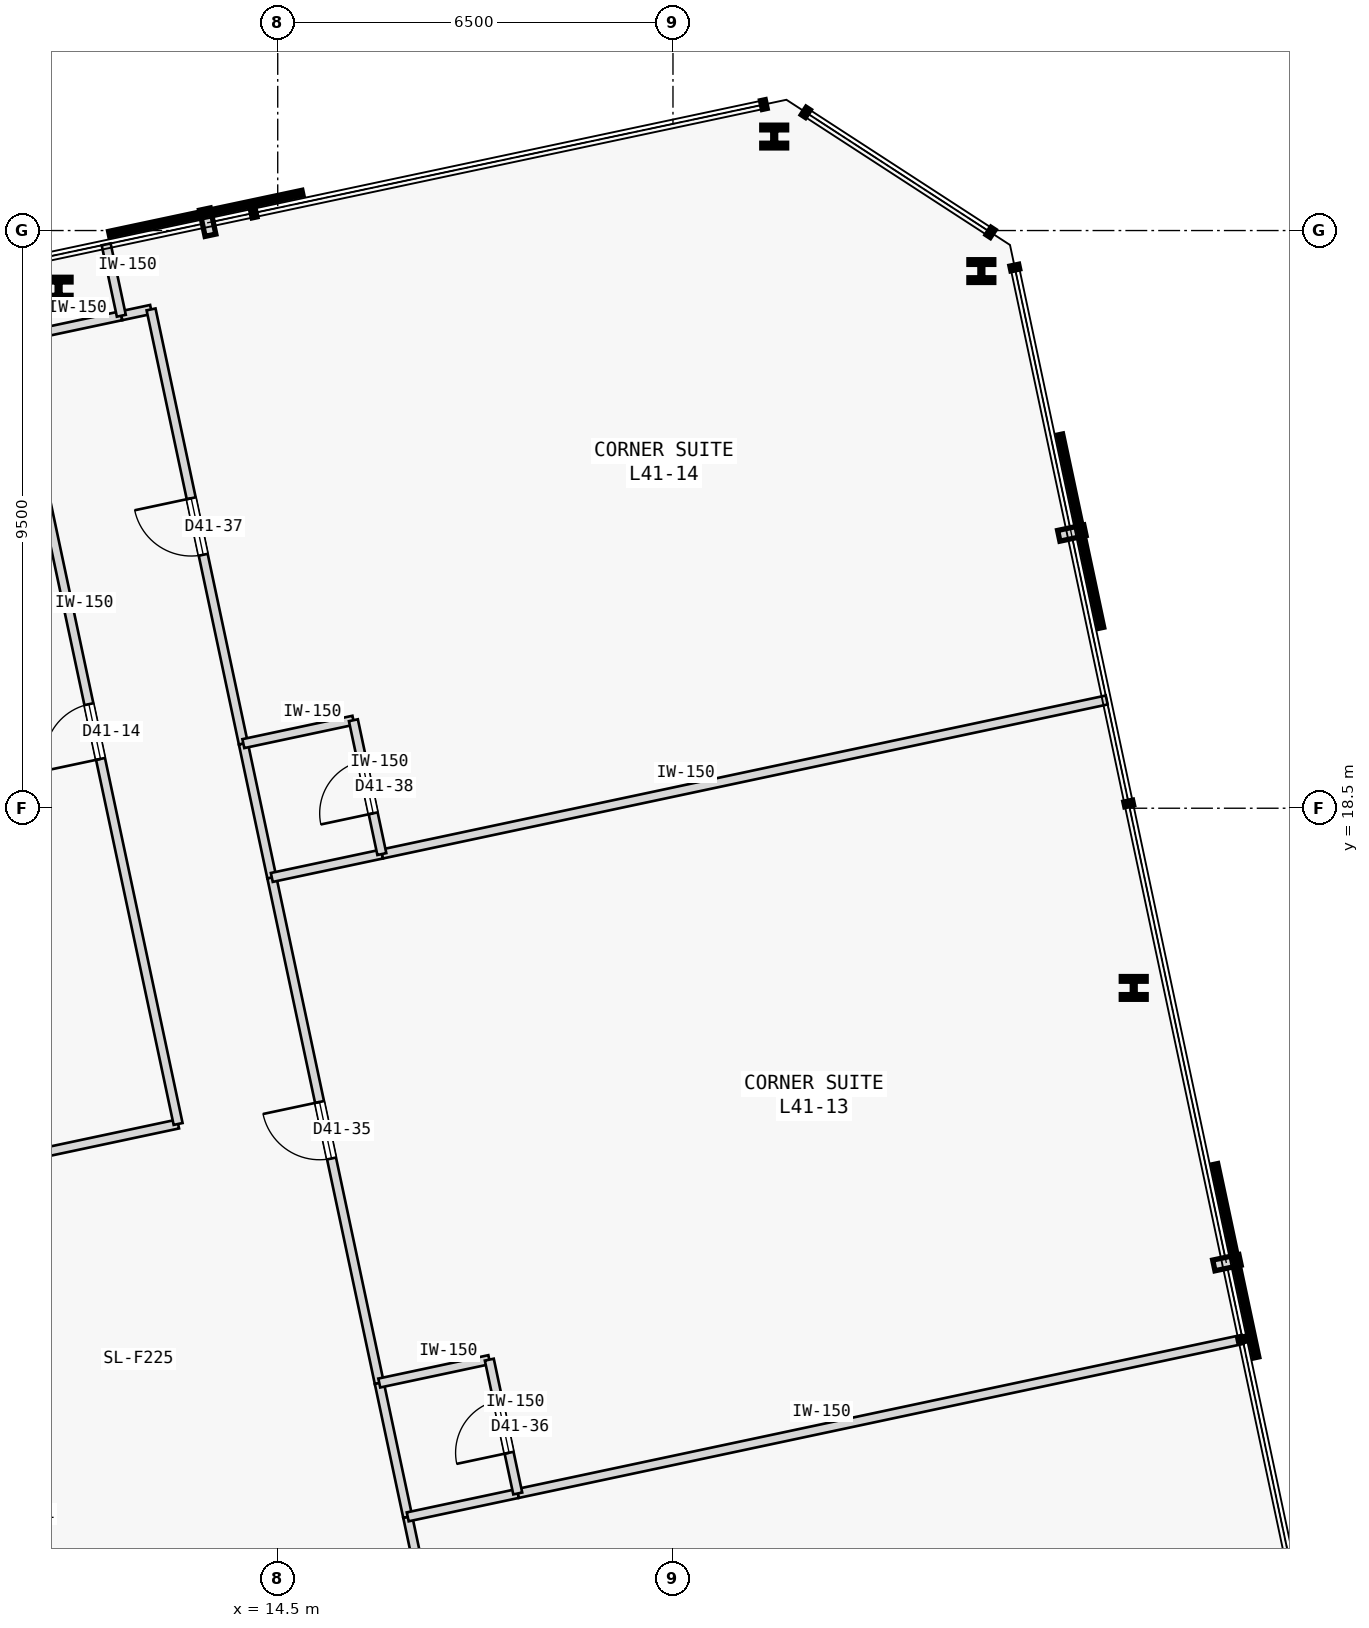
"""IFC4 building model, lengths in metres.
Left out: names, types, materials, properties, quantities, classifications, styles, units other than length and angle.
Written with IfcOpenShell. Run it as: python <this file> out.ifc"""

import sys

from ifc_helpers import new_model, si_unit, direction, frame, frame_2d, origin, origin_2d, place, context, subcontext, project, spatial, rectangle, i_section, extrude, element, fill, save


model = new_model("IFC4")
c1 = context("Model", 3, precision=1e-05, world=origin(), true_north=direction((0.0, 1.0)))
c2 = subcontext(c1, "Body", "Model", "MODEL_VIEW")
j1 = project(units=[si_unit("LENGTHUNIT", "METRE"), si_unit("PLANEANGLEUNIT", "RADIAN")], contexts=[c1])
p1 = place(None, origin())
s1 = spatial("IfcSite", under=j1, at=p1, CompositionType="ELEMENT")
p2 = place(p1, origin())
s2 = spatial("IfcBuilding", under=s1, at=p2, CompositionType="ELEMENT")
p3 = place(p2, frame((0.0, 0.0, 161.6)))
s3 = spatial("IfcBuildingStorey", under=s2, at=p3, CompositionType="ELEMENT", Elevation=161.6)
for number, where, z_axis, x_axis in (
    (1, (28.577, 15.545, 0.0), (0.0, 0.0, 1.0), (1.0, 0.0, 0.0)),
    (2, (26.071, 27.333, 0.0), (0.0, 0.0, 1.0), (1.0, 0.0, 0.0)),
    (3, (22.665, 29.546, 0.0), (0.0, 0.0, 1.0), (1.0, 0.0, 0.0)),
    (4, (10.896, 27.044, 0.0), (0.0, 0.0, 1.0), (1.0, 0.0, 0.0)),
):
    element("IfcColumn", number, at=place(p3, frame(where, z_axis=z_axis, x_axis=x_axis)), inside=s3, PredefinedType="COLUMN", context=c2, shape_type="SweptSolid", body=[
        extrude(i_section(OverallWidth=0.409, OverallDepth=0.374, WebThickness=0.048, FlangeThickness=0.077, FilletRadius=0.015, at=origin_2d()), origin(), (0.0, 0.0, 1.0), 3.4),
    ])
p4 = place(p3, frame((8.363, 12.352, 0.0), z_axis=(0.0, 0.0, 1.0), x_axis=(0.978153723809, 0.20788288193, 0.0)))
e5 = element("IfcWall", 5, at=p4, inside=s3, PredefinedType="PARTITIONING", context=c2, shape_type="SweptSolid", body=[
    extrude(rectangle(XDim=4.599, YDim=0.15, at=frame_2d((2.3, 0.0))), origin(), (0.0, 0.0, 1.0), 3.175),
])
p5 = place(p3, frame((12.862, 13.308, 0.0), z_axis=(0.0, 0.0, 1.0), x_axis=(-0.207911421929, 0.978147657888, 0.0)))
e6 = element("IfcWall", 6, at=p5, inside=s3, PredefinedType="PARTITIONING", context=c2, shape_type="SweptSolid", body=[
    extrude(rectangle(XDim=13.195, YDim=0.15, at=frame_2d((6.598, 0.0))), origin(), (0.0, 0.0, 1.0), 3.175),
])
p6 = place(p5, frame((6.137, 0.0, 0.0)))
e7 = element("IfcOpeningElement", 7, at=p6, cuts=e6, PredefinedType="OPENING", context=c2, shape_type="SweptSolid", body=[
    extrude(rectangle(XDim=0.92, YDim=2.15, at=frame_2d((0.46, 1.075))), frame((0.0, 0.085, 0.0), z_axis=(0.0, -1.0, 0.0), x_axis=(1.0, 0.0, 0.0)), (0.0, 0.0, 1.0), 0.17),
])
p7 = place(p3, frame((10.118, 26.214, 0.0), z_axis=(0.0, 0.0, 1.0), x_axis=(0.978133353907, 0.20797870558, 0.0)))
e8 = element("IfcWall", 8, at=p7, inside=s3, PredefinedType="PARTITIONING", context=c2, shape_type="SweptSolid", body=[
    extrude(rectangle(XDim=1.85, YDim=0.15, at=frame_2d((0.925, 0.0))), origin(), (0.0, 0.0, 1.0), 3.175),
])
p8 = place(p3, frame((18.405, -1.468, 0.0), z_axis=(0.0, 0.0, 1.0), x_axis=(-0.207888984761, 0.97815242678, 0.0)))
e9 = element("IfcWall", 9, at=p8, inside=s3, PredefinedType="PARTITIONING", context=c2, shape_type="SweptSolid", body=[
    extrude(rectangle(XDim=8.5, YDim=0.15, at=frame_2d((4.25, 0.0))), origin(), (0.0, 0.0, 1.0), 3.175),
])
p9 = place(p8, frame((3.775, 0.0, 0.0)))
e10 = element("IfcOpeningElement", 10, at=p9, cuts=e9, PredefinedType="OPENING", context=c2, shape_type="SweptSolid", body=[
    extrude(rectangle(XDim=0.95, YDim=2.15, at=frame_2d((0.475, 1.075))), frame((0.0, 0.085, 0.0), z_axis=(0.0, -1.0, 0.0), x_axis=(1.0, 0.0, 0.0)), (0.0, 0.0, 1.0), 0.17),
])
p10 = place(p3, frame((16.17, 9.047, 0.0), z_axis=(0.0, 0.0, 1.0), x_axis=(-0.2079164651, 0.978146585917, 0.0)))
e11 = element("IfcWall", 11, at=p10, inside=s3, PredefinedType="PARTITIONING", context=c2, shape_type="SweptSolid", body=[
    extrude(rectangle(XDim=8.5, YDim=0.15, at=frame_2d((4.25, 0.0))), origin(), (0.0, 0.0, 1.0), 3.175),
])
p11 = place(p10, frame((3.775, 0.0, 0.0)))
e12 = element("IfcOpeningElement", 12, at=p11, cuts=e11, PredefinedType="OPENING", context=c2, shape_type="SweptSolid", body=[
    extrude(rectangle(XDim=0.95, YDim=2.15, at=frame_2d((0.475, 1.075))), frame((0.0, 0.085, 0.0), z_axis=(0.0, -1.0, 0.0), x_axis=(1.0, 0.0, 0.0)), (0.0, 0.0, 1.0), 0.17),
])
p12 = place(p3, frame((16.638, 6.847, 0.0), z_axis=(0.0, 0.0, 1.0), x_axis=(-0.207913264065, 0.978147266328, 0.0)))
e13 = element("IfcWall", 13, at=p12, inside=s3, PredefinedType="PARTITIONING", context=c2, shape_type="SweptSolid", body=[
    extrude(rectangle(XDim=2.25, YDim=0.15, at=frame_2d((1.125, 0.0))), origin(), (0.0, 0.0, 1.0), 3.175),
])
p13 = place(p3, frame((11.928, 26.599, 0.0), z_axis=(0.0, 0.0, 1.0), x_axis=(0.97822210712, 0.207560856478, 0.0)))
e14 = element("IfcWall", 14, at=p13, inside=s3, PredefinedType="PARTITIONING", context=c2, shape_type="SweptSolid", body=[
    extrude(rectangle(XDim=0.5, YDim=0.15, at=frame_2d((0.25, 0.0))), origin(), (0.0, 0.0, 1.0), 3.175),
])
p14 = place(p3, frame((13.935, 19.562, 0.0), z_axis=(0.0, 0.0, 1.0), x_axis=(-0.207923154003, 0.978145164088, 0.0)))
e15 = element("IfcWall", 15, at=p14, inside=s3, PredefinedType="PARTITIONING", context=c2, shape_type="SweptSolid", body=[
    extrude(rectangle(XDim=7.3, YDim=0.15, at=frame_2d((3.65, 0.0))), origin(), (0.0, 0.0, 1.0), 3.175),
])
p15 = place(p14, frame((3.175, 0.0, 0.0)))
e16 = element("IfcOpeningElement", 16, at=p15, cuts=e15, PredefinedType="OPENING", context=c2, shape_type="SweptSolid", body=[
    extrude(rectangle(XDim=0.95, YDim=2.15, at=frame_2d((0.475, 1.075))), frame((0.0, 0.085, 0.0), z_axis=(0.0, -1.0, 0.0), x_axis=(1.0, 0.0, 0.0)), (0.0, 0.0, 1.0), 0.17),
])
p16 = place(p3, frame((14.403, 17.362, 0.0), z_axis=(0.0, 0.0, 1.0), x_axis=(-0.207913264065, 0.978147266328, 0.0)))
e17 = element("IfcWall", 17, at=p16, inside=s3, PredefinedType="PARTITIONING", context=c2, shape_type="SweptSolid", body=[
    extrude(rectangle(XDim=2.25, YDim=0.15, at=frame_2d((1.125, 0.0))), origin(), (0.0, 0.0, 1.0), 3.175),
])
p17 = place(p3, frame((11.928, 26.599, 0.0), z_axis=(0.0, 0.0, 1.0), x_axis=(-0.20795853359, 0.978137642823, 0.0)))
e18 = element("IfcWall", 18, at=p17, inside=s3, PredefinedType="PARTITIONING", context=c2, shape_type="SweptSolid", body=[
    extrude(rectangle(XDim=1.2, YDim=0.15, at=frame_2d((0.6, 0.0))), origin(), (0.0, 0.0, 1.0), 3.175),
])
p18 = place(p3, frame((18.447, 7.231, 0.0), z_axis=(0.0, 0.0, 1.0), x_axis=(0.978149634612, 0.207902121941, 0.0)))
e19 = element("IfcWall", 19, at=p18, inside=s3, PredefinedType="PARTITIONING", context=c2, shape_type="SweptSolid", body=[
    extrude(rectangle(XDim=12.187, YDim=0.15, at=frame_2d((6.094, 0.0))), origin(), (0.0, 0.0, 1.0), 3.175),
])
p19 = place(p3, frame((16.638, 6.847, 0.0), z_axis=(0.0, 0.0, 1.0), x_axis=(0.978160192495, 0.207852442415, 0.0)))
e20 = element("IfcWall", 20, at=p19, inside=s3, PredefinedType="PARTITIONING", context=c2, shape_type="SweptSolid", body=[
    extrude(rectangle(XDim=1.85, YDim=0.15, at=frame_2d((0.925, 0.0))), origin(), (0.0, 0.0, 1.0), 3.175),
])
p20 = place(p3, frame((16.17, 9.047, 0.0), z_axis=(0.0, 0.0, 1.0), x_axis=(0.978133353907, 0.20797870558, 0.0)))
e21 = element("IfcWall", 21, at=p20, inside=s3, PredefinedType="PARTITIONING", context=c2, shape_type="SweptSolid", body=[
    extrude(rectangle(XDim=1.85, YDim=0.15, at=frame_2d((0.925, 0.0))), origin(), (0.0, 0.0, 1.0), 3.175),
])
p21 = place(p3, frame((18.447, 7.231, 0.0), z_axis=(0.0, 0.0, 1.0), x_axis=(-0.207891197838, 0.978151956427, 0.0)))
e22 = element("IfcWall", 22, at=p21, inside=s3, PredefinedType="PARTITIONING", context=c2, shape_type="SweptSolid", body=[
    extrude(rectangle(XDim=2.25, YDim=0.15, at=frame_2d((1.125, 0.0))), origin(), (0.0, 0.0, 1.0), 3.175),
])
p22 = place(p21, frame((0.685, 0.0, 0.0)))
e23 = element("IfcOpeningElement", 23, at=p22, cuts=e22, PredefinedType="OPENING", context=c2, shape_type="SweptSolid", body=[
    extrude(rectangle(XDim=0.88, YDim=2.15, at=frame_2d((0.44, 1.075))), frame((0.0, 0.085, 0.0), z_axis=(0.0, -1.0, 0.0), x_axis=(1.0, 0.0, 0.0)), (0.0, 0.0, 1.0), 0.17),
])
p23 = place(p3, frame((16.212, 17.746, 0.0), z_axis=(0.0, 0.0, 1.0), x_axis=(0.978149634612, 0.207902121941, 0.0)))
e24 = element("IfcWall", 24, at=p23, inside=s3, PredefinedType="PARTITIONING", context=c2, shape_type="SweptSolid", body=[
    extrude(rectangle(XDim=12.187, YDim=0.15, at=frame_2d((6.094, 0.0))), origin(), (0.0, 0.0, 1.0), 3.175),
])
for number, where, z_axis, x_axis in (
    (25, (14.403, 17.362, 0.0), (0.0, 0.0, 1.0), (0.978, 0.208, 0.0)),
    (26, (13.935, 19.562, 0.0), (0.0, 0.0, 1.0), (0.978, 0.208, 0.0)),
):
    element("IfcWall", number, at=place(p3, frame(where, z_axis=z_axis, x_axis=x_axis)), inside=s3, PredefinedType="PARTITIONING", context=c2, shape_type="SweptSolid", body=[
        extrude(rectangle(XDim=1.85, YDim=0.15, at=frame_2d((0.925, 0.0))), origin(), (0.0, 0.0, 1.0), 3.175),
    ])
p24 = place(p3, frame((16.212, 17.746, 0.0), z_axis=(0.0, 0.0, 1.0), x_axis=(-0.207913264065, 0.978147266328, 0.0)))
e27 = element("IfcWall", 27, at=p24, inside=s3, PredefinedType="PARTITIONING", context=c2, shape_type="SweptSolid", body=[
    extrude(rectangle(XDim=2.25, YDim=0.15, at=frame_2d((1.125, 0.0))), origin(), (0.0, 0.0, 1.0), 3.175),
])
p25 = place(p24, frame((0.685, 0.0, 0.0)))
e28 = element("IfcOpeningElement", 28, at=p25, cuts=e27, PredefinedType="OPENING", context=c2, shape_type="SweptSolid", body=[
    extrude(rectangle(XDim=0.88, YDim=2.15, at=frame_2d((0.44, 1.075))), frame((0.0, 0.085, 0.0), z_axis=(0.0, -1.0, 0.0), x_axis=(1.0, 0.0, 0.0)), (0.0, 0.0, 1.0), 0.17),
])
p26 = place(p6, origin())
e29 = element("IfcDoor", 29, at=p26, inside=s3, OperationType="SINGLE_SWING_LEFT", PredefinedType="DOOR", context=c2, shape_type="SweptSolid", body=[
    extrude(rectangle(XDim=0.92, YDim=2.15, at=frame_2d((0.46, 1.075))), frame((0.0, 0.025, 0.0), z_axis=(0.0, -1.0, 0.0), x_axis=(1.0, 0.0, 0.0)), (0.0, 0.0, 1.0), 0.05),
])
fill(e7, e29)
p27 = place(p11, origin())
e30 = element("IfcDoor", 30, at=p27, inside=s3, OperationType="SINGLE_SWING_RIGHT", PredefinedType="DOOR", context=c2, shape_type="SweptSolid", body=[
    extrude(rectangle(XDim=0.95, YDim=2.15, at=frame_2d((0.475, 1.075))), frame((0.0, 0.025, 0.0), z_axis=(0.0, -1.0, 0.0), x_axis=(1.0, 0.0, 0.0)), (0.0, 0.0, 1.0), 0.05),
])
fill(e12, e30)
p28 = place(p22, origin())
e31 = element("IfcDoor", 31, at=p28, inside=s3, OperationType="SINGLE_SWING_LEFT", PredefinedType="DOOR", context=c2, shape_type="SweptSolid", body=[
    extrude(rectangle(XDim=0.88, YDim=2.15, at=frame_2d((0.44, 1.075))), frame((0.0, 0.025, 0.0), z_axis=(0.0, -1.0, 0.0), x_axis=(1.0, 0.0, 0.0)), (0.0, 0.0, 1.0), 0.05),
])
fill(e23, e31)
p29 = place(p15, origin())
e32 = element("IfcDoor", 32, at=p29, inside=s3, OperationType="SINGLE_SWING_RIGHT", PredefinedType="DOOR", context=c2, shape_type="SweptSolid", body=[
    extrude(rectangle(XDim=0.95, YDim=2.15, at=frame_2d((0.475, 1.075))), frame((0.0, 0.025, 0.0), z_axis=(0.0, -1.0, 0.0), x_axis=(1.0, 0.0, 0.0)), (0.0, 0.0, 1.0), 0.05),
])
fill(e16, e32)
p30 = place(p25, origin())
e33 = element("IfcDoor", 33, at=p30, inside=s3, OperationType="SINGLE_SWING_LEFT", PredefinedType="DOOR", context=c2, shape_type="SweptSolid", body=[
    extrude(rectangle(XDim=0.88, YDim=2.15, at=frame_2d((0.44, 1.075))), frame((0.0, 0.025, 0.0), z_axis=(0.0, -1.0, 0.0), x_axis=(1.0, 0.0, 0.0)), (0.0, 0.0, 1.0), 0.05),
])
fill(e28, e33)
save(model, sys.argv[1])
